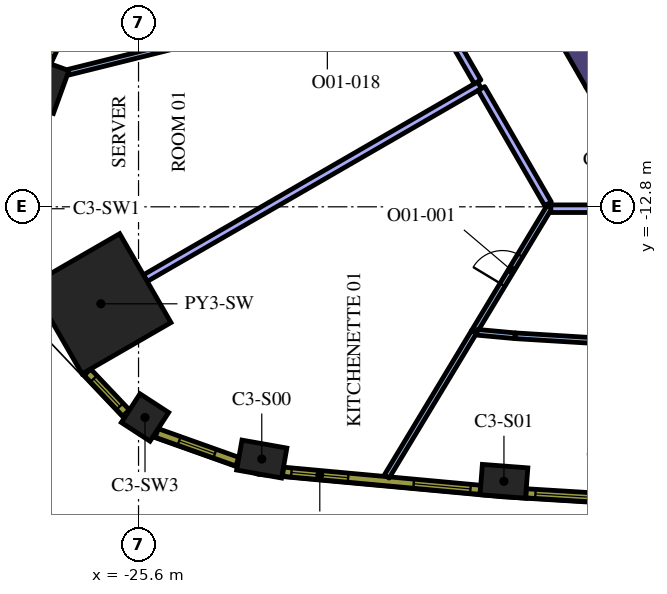
"""IFC4 building model, lengths in metres.
Left out: names, types, materials, properties, quantities, classifications, styles, units other than length and angle.
Written with IfcOpenShell. Run it as: python <this file> out.ifc"""

import sys

from ifc_helpers import new_model, si_unit, direction, frame, frame_2d, origin, origin_2d, place, context, subcontext, project, spatial, polyline, rectangle, outline, extrude, element, fill, save


model = new_model("IFC4")
c1 = context("Model", 3, precision=1e-05, world=origin(), true_north=direction((0.0, 1.0)))
c2 = subcontext(c1, "Body", "Model", "MODEL_VIEW")
j1 = project(units=[si_unit("LENGTHUNIT", "METRE"), si_unit("PLANEANGLEUNIT", "RADIAN")], contexts=[c1])
p1 = place(None, origin())
s1 = spatial("IfcSite", under=j1, at=p1, CompositionType="ELEMENT")
p2 = place(p1, origin())
s2 = spatial("IfcBuilding", under=s1, at=p2, CompositionType="ELEMENT")
p3 = place(p2, frame((0.0, 0.0, 150.0)))
s3 = spatial("IfcBuildingStorey", under=s2, at=p3, CompositionType="ELEMENT", Elevation=150.0)
p4 = place(p3, frame((-26.591, -15.352, 0.0), z_axis=(0.0, 0.0, 1.0), x_axis=(-0.866025403784, -0.5, 0.0)))
e1 = element("IfcColumn", 1, at=p4, inside=s3, PredefinedType="COLUMN", context=c2, shape_type="SweptSolid", body=[
    extrude(rectangle(XDim=2.7, YDim=2.7, at=origin_2d()), origin(), (0.0, 0.0, 1.0), 4.2),
])
for number, where, z_axis, x_axis in (
    (2, (-22.357, -19.437, 0.0), (0.0, 0.0, 1.0), (0.985, -0.175, 0.0)),
    (3, (-15.985, -20.022, 0.0), (0.0, 0.0, 1.0), (0.997, -0.076, 0.0)),
    (4, (-28.012, -9.644, 0.0), (0.0, 0.0, 1.0), (-0.341, -0.94, 0.0)),
):
    element("IfcColumn", number, at=place(p3, frame(where, z_axis=z_axis, x_axis=x_axis)), inside=s3, PredefinedType="COLUMN", context=c2, shape_type="SweptSolid", body=[
        extrude(rectangle(XDim=1.2, YDim=0.8, at=origin_2d()), origin(), (0.0, 0.0, 1.0), 4.2),
    ])
p5 = place(p3, frame((-25.43, -18.344, 0.0), z_axis=(0.0, 0.0, 1.0), x_axis=(0.838094050847, -0.545525766518, 0.0)))
e5 = element("IfcColumn", 5, at=p5, inside=s3, PredefinedType="COLUMN", context=c2, shape_type="SweptSolid", body=[
    extrude(rectangle(XDim=0.9, YDim=0.9, at=origin_2d()), origin(), (0.0, 0.0, 1.0), 4.2),
])
p6 = place(p3, origin())
e6 = element("IfcWall", 6, at=p6, inside=s3, PredefinedType="SOLIDWALL", context=c2, shape_type="SweptSolid", body=[
    extrude(outline(polyline([(-13.828, -9.65), (-13.38, -9.65), (-13.38, -10.426), (-13.828, -9.65)])), origin(), (0.0, 0.0, 1.0), 4.2),
])
p7 = place(p3, frame((-15.387, -6.148, 0.0), z_axis=(0.0, 0.0, 1.0), x_axis=(0.499984020225, -0.866034629516, 0.0)))
e7 = element("IfcWall", 7, at=p7, inside=s3, PredefinedType="SOLIDWALL", context=c2, shape_type="SweptSolid", body=[
    extrude(rectangle(XDim=3.824, YDim=0.8, at=frame_2d((1.912, 0.0))), origin(), (0.0, 0.0, 1.0), 4.2),
])
e8 = element("IfcWall", 8, at=p6, inside=s3, PredefinedType="SOLIDWALL", context=c2, shape_type="SweptSolid", body=[
    extrude(outline(polyline([(-12.904, -9.65), (-13.8, -9.65), (-13.128, -9.262), (-12.904, -9.65)])), origin(), (0.0, 0.0, 1.0), 4.2),
])
p8 = place(p3, frame((-12.84, -9.511, 0.0), z_axis=(0.0, 0.0, 1.0), x_axis=(-0.499997733992, 0.866026712061, 0.0)))
e9 = element("IfcWall", 9, at=p8, inside=s3, PredefinedType="SOLIDWALL", context=c2, shape_type="SweptSolid", body=[
    extrude(rectangle(XDim=3.634, YDim=0.25, at=frame_2d((1.817, 0.0))), origin(), (0.0, 0.0, 1.0), 4.2),
])
p9 = place(p3, frame((-16.771, -16.09, 0.0), z_axis=(0.0, 0.0, 1.0), x_axis=(-0.516817512045, -0.856095590015, 0.0)))
e10 = element("IfcWall", 10, at=p9, inside=s3, PredefinedType="PARTITIONING", context=c2, shape_type="SweptSolid", body=[
    extrude(rectangle(XDim=4.45, YDim=0.15, at=frame_2d((2.225, 0.0))), origin(), (0.0, 0.0, 1.0), 3.15),
])
p10 = place(p3, frame((-16.775, -16.097, 0.0), z_axis=(0.0, 0.0, 1.0), x_axis=(0.516793803756, 0.856109902057, 0.0)))
e11 = element("IfcWall", 11, at=p10, inside=s3, PredefinedType="PARTITIONING", context=c2, shape_type="SweptSolid", body=[
    extrude(rectangle(XDim=3.856, YDim=0.15, at=frame_2d((1.928, 0.0))), origin(), (0.0, 0.0, 1.0), 3.15),
])
p11 = place(p10, frame((1.456, 0.0, 0.0)))
e12 = element("IfcOpeningElement", 12, at=p11, cuts=e11, PredefinedType="OPENING", context=c2, shape_type="SweptSolid", body=[
    extrude(rectangle(XDim=0.9, YDim=2.1, at=frame_2d((0.45, 1.05))), frame((0.0, 0.085, 0.0), z_axis=(0.0, -1.0, 0.0), x_axis=(1.0, 0.0, 0.0)), (0.0, 0.0, 1.0), 0.17),
])
p12 = place(p3, frame((-25.421, -14.677, 0.0), z_axis=(0.0, 0.0, 1.0), x_axis=(0.866031435434, 0.499989552732, 0.0)))
e13 = element("IfcWall", 13, at=p12, inside=s3, PredefinedType="PARTITIONING", context=c2, shape_type="SweptSolid", body=[
    extrude(rectangle(XDim=10.154, YDim=0.2, at=frame_2d((5.077, 0.0))), origin(), (0.0, 0.0, 1.0), 3.15),
])
p13 = place(p3, frame((-16.578, -9.687, 0.0), z_axis=(0.0, 0.0, 1.0), x_axis=(0.499981686864, -0.86603597662, 0.0)))
e14 = element("IfcWall", 14, at=p13, inside=s3, PredefinedType="PARTITIONING", context=c2, shape_type="SweptSolid", body=[
    extrude(rectangle(XDim=3.506, YDim=0.2, at=frame_2d((1.753, 0.0))), origin(), (0.0, 0.0, 1.0), 3.15),
])
p14 = place(p3, frame((-16.69, -16.102, 0.0), z_axis=(0.0, 0.0, 1.0), x_axis=(0.995818997537, -0.091348366946, 0.0)))
e15 = element("IfcWall", 15, at=p14, inside=s3, PredefinedType="PARTITIONING", context=c2, shape_type="SweptSolid", body=[
    extrude(rectangle(XDim=1.002, YDim=0.15, at=frame_2d((0.501, 0.0))), origin(), (0.0, 0.0, 1.0), 3.15),
])
p15 = place(p3, frame((-9.421, -16.576, 0.0), z_axis=(0.0, 0.0, 1.0), x_axis=(-0.998137075468, 0.061011298754, 0.0)))
e16 = element("IfcWall", 16, at=p15, inside=s3, PredefinedType="PARTITIONING", context=c2, shape_type="SweptSolid", body=[
    extrude(rectangle(XDim=6.282, YDim=0.15, at=frame_2d((3.141, 0.0))), origin(), (0.0, 0.0, 1.0), 3.15),
])
p16 = place(p15, frame((2.683, 0.0, 0.0)))
e17 = element("IfcOpeningElement", 17, at=p16, cuts=e16, PredefinedType="OPENING", context=c2, shape_type="SweptSolid", body=[
    extrude(rectangle(XDim=0.9, YDim=2.1, at=frame_2d((0.45, 1.05))), frame((0.0, 0.085, 0.0), z_axis=(0.0, -1.0, 0.0), x_axis=(1.0, 0.0, 0.0)), (0.0, 0.0, 1.0), 0.17),
])
p17 = place(p3, frame((-14.751, -12.85, 0.0), z_axis=(0.0, 0.0, 1.0), x_axis=(1.0, 0.0, 0.0)))
e18 = element("IfcWall", 18, at=p17, inside=s3, PredefinedType="PARTITIONING", context=c2, shape_type="SweptSolid", body=[
    extrude(rectangle(XDim=9.721, YDim=0.2, at=frame_2d((4.861, 0.0))), origin(), (0.0, 0.0, 1.0), 3.15),
])
p18 = place(p3, frame((-23.203, -8.205, 0.0), z_axis=(0.0, 0.0, 1.0), x_axis=(-0.970525493326, -0.240998478843, 0.0)))
e19 = element("IfcWall", 19, at=p18, inside=s3, PredefinedType="PARTITIONING", context=c2, shape_type="SweptSolid", body=[
    extrude(rectangle(XDim=4.373, YDim=0.15, at=frame_2d((2.187, 0.0))), origin(), (0.0, 0.0, 1.0), 3.15),
])
p19 = place(p3, frame((-18.118, -7.02, 0.0), z_axis=(0.0, 0.0, 1.0), x_axis=(0.500023335103, -0.866011930837, 0.0)))
e20 = element("IfcWall", 20, at=p19, inside=s3, PredefinedType="PARTITIONING", context=c2, shape_type="SweptSolid", body=[
    extrude(rectangle(XDim=2.88, YDim=0.2, at=frame_2d((1.44, 0.0))), origin(), (0.0, 0.0, 1.0), 3.15),
])
p20 = place(p3, frame((-21.797, -19.77, 0.0), z_axis=(0.0, 0.0, 1.0), x_axis=(0.995808712151, -0.091460422067, 0.0)))
e21 = element("IfcWall", 21, at=p20, inside=s3, PredefinedType="SOLIDWALL", context=c2, shape_type="SweptSolid", body=[
    extrude(rectangle(XDim=5.213, YDim=0.24, at=frame_2d((2.606, 0.0))), origin(), (0.0, 0.0, 1.0), 3.95),
])
p21 = place(p20, frame((0.221, 0.0, 0.9)))
e22 = element("IfcOpeningElement", 22, at=p21, cuts=e21, PredefinedType="OPENING", context=c2, shape_type="SweptSolid", body=[
    extrude(rectangle(XDim=1.5, YDim=2.55, at=frame_2d((0.75, 1.275))), frame((0.0, 0.13, 0.0), z_axis=(0.0, -1.0, 0.0), x_axis=(1.0, 0.0, 0.0)), (0.0, 0.0, 1.0), 0.26),
])
p22 = place(p20, frame((3.452, 0.0, 0.9)))
e23 = element("IfcOpeningElement", 23, at=p22, cuts=e21, PredefinedType="OPENING", context=c2, shape_type="SweptSolid", body=[
    extrude(rectangle(XDim=1.5, YDim=2.55, at=frame_2d((0.75, 1.275))), frame((0.0, 0.13, 0.0), z_axis=(0.0, -1.0, 0.0), x_axis=(1.0, 0.0, 0.0)), (0.0, 0.0, 1.0), 0.26),
])
p23 = place(p3, frame((-15.405, -20.338, 0.0), z_axis=(0.0, 0.0, 1.0), x_axis=(0.998135294646, -0.061040425794, 0.0)))
e24 = element("IfcWall", 24, at=p23, inside=s3, PredefinedType="SOLIDWALL", context=c2, shape_type="SweptSolid", body=[
    extrude(rectangle(XDim=5.204, YDim=0.24, at=frame_2d((2.602, 0.0))), origin(), (0.0, 0.0, 1.0), 3.95),
])
p24 = place(p23, frame((0.248, 0.0, 0.9)))
e25 = element("IfcOpeningElement", 25, at=p24, cuts=e24, PredefinedType="OPENING", context=c2, shape_type="SweptSolid", body=[
    extrude(rectangle(XDim=1.5, YDim=2.55, at=frame_2d((0.75, 1.275))), frame((0.0, 0.13, 0.0), z_axis=(0.0, -1.0, 0.0), x_axis=(1.0, 0.0, 0.0)), (0.0, 0.0, 1.0), 0.26),
])
p25 = place(p23, frame((3.455, 0.0, 0.9)))
e26 = element("IfcOpeningElement", 26, at=p25, cuts=e24, PredefinedType="OPENING", context=c2, shape_type="SweptSolid", body=[
    extrude(rectangle(XDim=1.5, YDim=2.55, at=frame_2d((0.75, 1.275))), frame((0.0, 0.13, 0.0), z_axis=(0.0, -1.0, 0.0), x_axis=(1.0, 0.0, 0.0)), (0.0, 0.0, 1.0), 0.26),
])
p26 = place(p3, frame((-25.837, -4.258, 0.0), z_axis=(0.0, 0.0, 1.0), x_axis=(-0.418722559465, -0.908114209885, 0.0)))
e27 = element("IfcWall", 27, at=p26, inside=s3, PredefinedType="SOLIDWALL", context=c2, shape_type="SweptSolid", body=[
    extrude(rectangle(XDim=5.213, YDim=0.24, at=frame_2d((2.606, 0.0))), origin(), (0.0, 0.0, 1.0), 3.95),
])
p27 = place(p26, frame((0.261, 0.0, 0.9)))
e28 = element("IfcOpeningElement", 28, at=p27, cuts=e27, PredefinedType="OPENING", context=c2, shape_type="SweptSolid", body=[
    extrude(rectangle(XDim=1.5, YDim=2.55, at=frame_2d((0.75, 1.275))), frame((0.0, 0.13, 0.0), z_axis=(0.0, -1.0, 0.0), x_axis=(1.0, 0.0, 0.0)), (0.0, 0.0, 1.0), 0.26),
])
p28 = place(p26, frame((3.492, 0.0, 0.9)))
e29 = element("IfcOpeningElement", 29, at=p28, cuts=e27, PredefinedType="OPENING", context=c2, shape_type="SweptSolid", body=[
    extrude(rectangle(XDim=1.5, YDim=2.55, at=frame_2d((0.75, 1.275))), frame((0.0, 0.13, 0.0), z_axis=(0.0, -1.0, 0.0), x_axis=(1.0, 0.0, 0.0)), (0.0, 0.0, 1.0), 0.26),
])
p29 = place(p3, frame((-26.946, -17.151, 0.0), z_axis=(0.0, 0.0, 1.0), x_axis=(0.687986858937, -0.725723144133, 0.0)))
e30 = element("IfcWall", 30, at=p29, inside=s3, PredefinedType="SOLIDWALL", context=c2, shape_type="SweptSolid", body=[
    extrude(rectangle(XDim=1.481, YDim=0.24, at=frame_2d((0.741, 0.0))), origin(), (0.0, 0.0, 1.0), 3.95),
])
p30 = place(p29, frame((0.241, 0.0, 0.9)))
e31 = element("IfcOpeningElement", 31, at=p30, cuts=e30, PredefinedType="OPENING", context=c2, shape_type="SweptSolid", body=[
    extrude(rectangle(XDim=1.0, YDim=2.55, at=frame_2d((0.5, 1.275))), frame((0.0, 0.13, 0.0), z_axis=(0.0, -1.0, 0.0), x_axis=(1.0, 0.0, 0.0)), (0.0, 0.0, 1.0), 0.26),
])
p31 = place(p3, frame((-25.121, -18.751, 0.0), z_axis=(0.0, 0.0, 1.0), x_axis=(0.942099727267, -0.335332825539, 0.0)))
e32 = element("IfcWall", 32, at=p31, inside=s3, PredefinedType="SOLIDWALL", context=c2, shape_type="SweptSolid", body=[
    extrude(rectangle(XDim=2.25, YDim=0.24, at=frame_2d((1.125, 0.0))), origin(), (0.0, 0.0, 1.0), 3.95),
])
p32 = place(p31, frame((0.625, 0.0, 0.9)))
e33 = element("IfcOpeningElement", 33, at=p32, cuts=e32, PredefinedType="OPENING", context=c2, shape_type="SweptSolid", body=[
    extrude(rectangle(XDim=1.0, YDim=2.55, at=frame_2d((0.5, 1.275))), frame((0.0, 0.13, 0.0), z_axis=(0.0, -1.0, 0.0), x_axis=(1.0, 0.0, 0.0)), (0.0, 0.0, 1.0), 0.26),
])
p33 = place(p11, origin())
e34 = element("IfcDoor", 34, at=p33, inside=s3, OperationType="SINGLE_SWING_LEFT", PredefinedType="DOOR", context=c2, shape_type="SweptSolid", body=[
    extrude(rectangle(XDim=0.9, YDim=2.1, at=frame_2d((0.45, 1.05))), frame((0.0, 0.025, 0.0), z_axis=(0.0, -1.0, 0.0), x_axis=(1.0, 0.0, 0.0)), (0.0, 0.0, 1.0), 0.05),
])
fill(e12, e34)
p34 = place(p21, origin())
e35 = element("IfcWindow", 35, at=p34, inside=s3, PartitioningType="SINGLE_PANEL", PredefinedType="WINDOW", context=c2, shape_type="SweptSolid", body=[
    extrude(rectangle(XDim=1.5, YDim=2.55, at=frame_2d((0.75, 1.275))), frame((0.0, 0.04, 0.0), z_axis=(0.0, -1.0, 0.0), x_axis=(1.0, 0.0, 0.0)), (0.0, 0.0, 1.0), 0.06),
])
fill(e22, e35)
p35 = place(p22, origin())
e36 = element("IfcWindow", 36, at=p35, inside=s3, PartitioningType="SINGLE_PANEL", PredefinedType="WINDOW", context=c2, shape_type="SweptSolid", body=[
    extrude(rectangle(XDim=1.5, YDim=2.55, at=frame_2d((0.75, 1.275))), frame((0.0, 0.04, 0.0), z_axis=(0.0, -1.0, 0.0), x_axis=(1.0, 0.0, 0.0)), (0.0, 0.0, 1.0), 0.06),
])
fill(e23, e36)
p36 = place(p24, origin())
e37 = element("IfcWindow", 37, at=p36, inside=s3, PartitioningType="SINGLE_PANEL", PredefinedType="WINDOW", context=c2, shape_type="SweptSolid", body=[
    extrude(rectangle(XDim=1.5, YDim=2.55, at=frame_2d((0.75, 1.275))), frame((0.0, 0.04, 0.0), z_axis=(0.0, -1.0, 0.0), x_axis=(1.0, 0.0, 0.0)), (0.0, 0.0, 1.0), 0.06),
])
fill(e25, e37)
p37 = place(p28, origin())
e38 = element("IfcWindow", 38, at=p37, inside=s3, PartitioningType="SINGLE_PANEL", PredefinedType="WINDOW", context=c2, shape_type="SweptSolid", body=[
    extrude(rectangle(XDim=1.5, YDim=2.55, at=frame_2d((0.75, 1.275))), frame((0.0, 0.04, 0.0), z_axis=(0.0, -1.0, 0.0), x_axis=(1.0, 0.0, 0.0)), (0.0, 0.0, 1.0), 0.06),
])
fill(e29, e38)
p38 = place(p30, origin())
e39 = element("IfcWindow", 39, at=p38, inside=s3, PartitioningType="SINGLE_PANEL", PredefinedType="WINDOW", context=c2, shape_type="SweptSolid", body=[
    extrude(rectangle(XDim=1.0, YDim=2.55, at=frame_2d((0.5, 1.275))), frame((0.0, 0.04, 0.0), z_axis=(0.0, -1.0, 0.0), x_axis=(1.0, 0.0, 0.0)), (0.0, 0.0, 1.0), 0.06),
])
fill(e31, e39)
p39 = place(p32, origin())
e40 = element("IfcWindow", 40, at=p39, inside=s3, PartitioningType="SINGLE_PANEL", PredefinedType="WINDOW", context=c2, shape_type="SweptSolid", body=[
    extrude(rectangle(XDim=1.0, YDim=2.55, at=frame_2d((0.5, 1.275))), frame((0.0, 0.04, 0.0), z_axis=(0.0, -1.0, 0.0), x_axis=(1.0, 0.0, 0.0)), (0.0, 0.0, 1.0), 0.06),
])
fill(e33, e40)
save(model, sys.argv[1])
